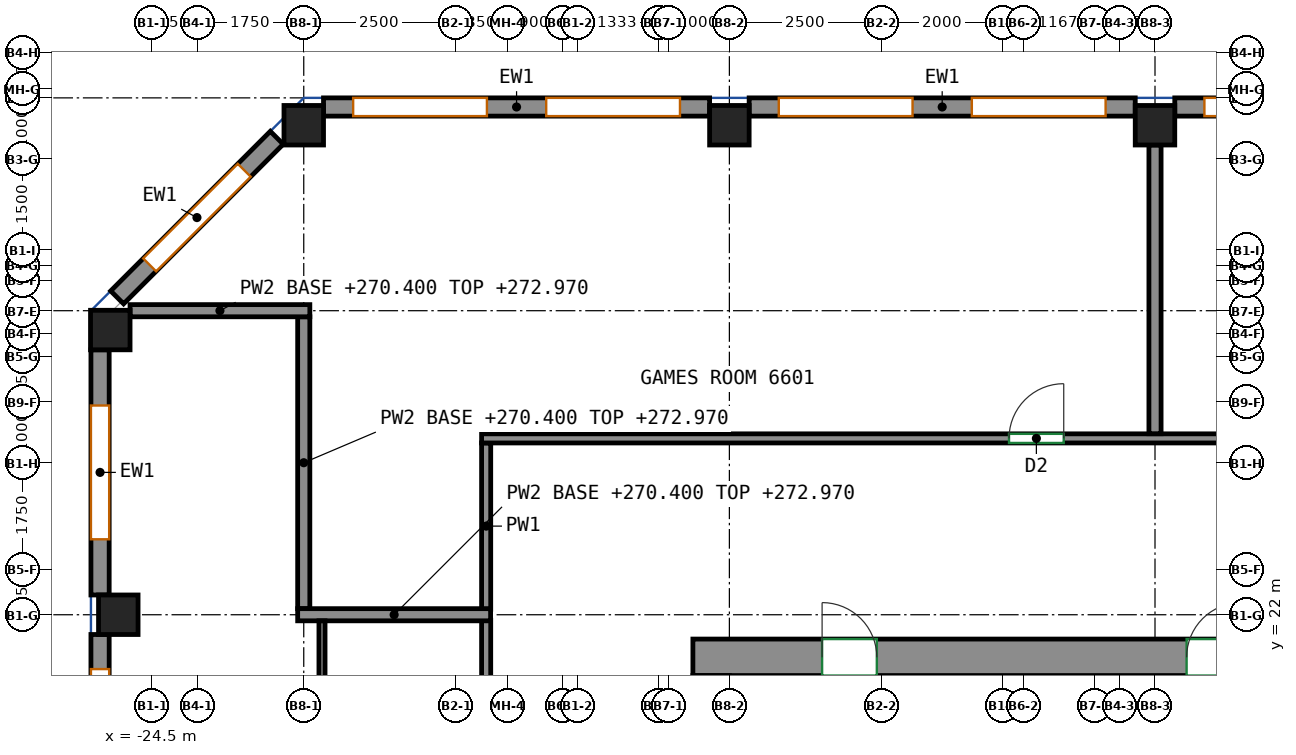
"""IFC4 building model, lengths in metres.
Left out: names, types, materials, properties, quantities, classifications, styles, units other than length and angle.
Written with IfcOpenShell. Run it as: python <this file> out.ifc"""

import sys

from ifc_helpers import new_model, si_unit, direction, frame, frame_2d, origin, origin_2d, place, context, subcontext, project, spatial, rectangle, extrude, source, transform, mapped, element, fill, save


model = new_model("IFC4")
c1 = context("Model", 3, precision=1e-05, world=origin(), true_north=direction((0.0, 1.0)))
c2 = subcontext(c1, "Body", "Model", "MODEL_VIEW")
j1 = project(units=[si_unit("LENGTHUNIT", "METRE"), si_unit("PLANEANGLEUNIT", "RADIAN")], contexts=[c1])
p1 = place(None, origin())
s1 = spatial("IfcSite", under=j1, at=p1, CompositionType="ELEMENT")
p2 = place(p1, origin())
s2 = spatial("IfcBuilding", under=s1, at=p2, CompositionType="ELEMENT")
p3 = place(p2, frame((0.0, 0.0, 270.4)))
s3 = spatial("IfcBuildingStorey", under=s2, at=p3, CompositionType="ELEMENT", Elevation=270.4)
m1 = source(origin(), c2, "Body", "SweptSolid", [
    extrude(rectangle(XDim=0.65, YDim=0.65, at=origin_2d()), origin(), (0.0, 0.0, 1.0), 3.12),
])
for number, where, z_axis, x_axis in (
    (1, (-25.182, 26.682, 0.0), (0.0, 0.0, 1.0), (1.0, 0.0, 0.0)),
    (2, (-25.05, 22.0, 0.0), (0.0, 0.0, 1.0), (1.0, 0.0, 0.0)),
    (3, (-22.0, 30.05, 0.0), (0.0, 0.0, 1.0), (1.0, 0.0, 0.0)),
    (4, (-15.0, 30.05, 0.0), (0.0, 0.0, 1.0), (1.0, 0.0, 0.0)),
    (5, (-8.0, 30.05, 0.0), (0.0, 0.0, 1.0), (1.0, 0.0, 0.0)),
):
    element("IfcColumn", number, at=place(p3, frame(where, z_axis=z_axis, x_axis=x_axis)), inside=s3, PredefinedType="COLUMN", context=c2, shape_type="MappedRepresentation", body=[
        mapped(m1, transform((0.0, 0.0, 0.0))),
    ])
m2 = source(origin(), c2, "Body", "SweptSolid", [
    extrude(rectangle(XDim=33.3, YDim=0.6, at=frame_2d((16.65, 0.0))), origin(), (0.0, 0.0, 1.0), 3.12),
])
p4 = place(p3, frame((-15.6, 21.3, 0.0), z_axis=(0.0, 0.0, 1.0), x_axis=(1.0, 0.0, 0.0)))
e6 = element("IfcWall", 6, at=p4, inside=s3, PredefinedType="SHEAR", context=c2, shape_type="MappedRepresentation", body=[
    mapped(m2, transform((0.0, 0.0, 0.0))),
])
p5 = place(p4, frame((8.12, 0.0, 0.0)))
e7 = element("IfcOpeningElement", 7, at=p5, cuts=e6, PredefinedType="OPENING", context=c2, shape_type="SweptSolid", body=[
    extrude(rectangle(XDim=0.9, YDim=2.1, at=frame_2d((0.45, 1.05))), frame((0.0, 0.31, 0.0), z_axis=(0.0, -1.0, 0.0), x_axis=(1.0, 0.0, 0.0)), (0.0, 0.0, 1.0), 0.62),
])
p6 = place(p4, frame((14.15, 0.0, 0.0)))
e8 = element("IfcOpeningElement", 8, at=p6, cuts=e6, PredefinedType="OPENING", context=c2, shape_type="SweptSolid", body=[
    extrude(rectangle(XDim=0.9, YDim=2.1, at=frame_2d((0.45, 1.05))), frame((0.0, 0.31, 0.0), z_axis=(0.0, -1.0, 0.0), x_axis=(1.0, 0.0, 0.0)), (0.0, 0.0, 1.0), 0.62),
])
p7 = place(p4, frame((18.974, 0.0, 0.0)))
e9 = element("IfcOpeningElement", 9, at=p7, cuts=e6, PredefinedType="OPENING", context=c2, shape_type="SweptSolid", body=[
    extrude(rectangle(XDim=0.9, YDim=2.1, at=frame_2d((0.45, 1.05))), frame((0.0, 0.31, 0.0), z_axis=(0.0, -1.0, 0.0), x_axis=(1.0, 0.0, 0.0)), (0.0, 0.0, 1.0), 0.62),
])
p8 = place(p4, frame((23.664, 0.0, 0.0)))
e10 = element("IfcOpeningElement", 10, at=p8, cuts=e6, PredefinedType="OPENING", context=c2, shape_type="SweptSolid", body=[
    extrude(rectangle(XDim=0.9, YDim=2.1, at=frame_2d((0.45, 1.05))), frame((0.0, 0.31, 0.0), z_axis=(0.0, -1.0, 0.0), x_axis=(1.0, 0.0, 0.0)), (0.0, 0.0, 1.0), 0.62),
])
p9 = place(p4, frame((26.92, 0.0, 0.0)))
e11 = element("IfcOpeningElement", 11, at=p9, cuts=e6, PredefinedType="OPENING", context=c2, shape_type="SweptSolid", body=[
    extrude(rectangle(XDim=0.9, YDim=2.1, at=frame_2d((0.45, 1.05))), frame((0.0, 0.31, 0.0), z_axis=(0.0, -1.0, 0.0), x_axis=(1.0, 0.0, 0.0)), (0.0, 0.0, 1.0), 0.62),
])
p10 = place(p4, frame((2.125, 0.0, 0.0)))
e12 = element("IfcOpeningElement", 12, at=p10, cuts=e6, PredefinedType="OPENING", context=c2, shape_type="SweptSolid", body=[
    extrude(rectangle(XDim=0.9, YDim=2.1, at=frame_2d((0.45, 1.05))), frame((0.0, 0.31, 0.0), z_axis=(0.0, -1.0, 0.0), x_axis=(1.0, 0.0, 0.0)), (0.0, 0.0, 1.0), 0.62),
])
p11 = place(p4, frame((30.275, 0.0, 0.0)))
e13 = element("IfcOpeningElement", 13, at=p11, cuts=e6, PredefinedType="OPENING", context=c2, shape_type="SweptSolid", body=[
    extrude(rectangle(XDim=0.9, YDim=2.1, at=frame_2d((0.45, 1.05))), frame((0.0, 0.31, 0.0), z_axis=(0.0, -1.0, 0.0), x_axis=(1.0, 0.0, 0.0)), (0.0, 0.0, 1.0), 0.62),
])
m3 = source(origin(), c2, "Body", "SweptSolid", [
    extrude(rectangle(XDim=6.35, YDim=0.3, at=frame_2d((3.175, 0.0))), origin(), (0.0, 0.0, 1.0), 3.12),
])
p12 = place(p3, frame((-1.325, 30.35, 0.0), z_axis=(0.0, 0.0, 1.0), x_axis=(-1.0, 0.0, 0.0)))
e14 = element("IfcWall", 14, at=p12, inside=s3, PredefinedType="SOLIDWALL", context=c2, shape_type="MappedRepresentation", body=[
    mapped(m3, transform((0.0, 0.0, 0.0))),
])
p13 = place(p12, frame((0.488, 0.0, 0.8)))
e15 = element("IfcOpeningElement", 15, at=p13, cuts=e14, PredefinedType="OPENING", context=c2, shape_type="SweptSolid", body=[
    extrude(rectangle(XDim=2.2, YDim=2.05, at=frame_2d((1.1, 1.025))), frame((0.0, 0.16, 0.0), z_axis=(0.0, -1.0, 0.0), x_axis=(1.0, 0.0, 0.0)), (0.0, 0.0, 1.0), 0.32),
])
p14 = place(p12, frame((3.663, 0.0, 0.8)))
e16 = element("IfcOpeningElement", 16, at=p14, cuts=e14, PredefinedType="OPENING", context=c2, shape_type="SweptSolid", body=[
    extrude(rectangle(XDim=2.2, YDim=2.05, at=frame_2d((1.1, 1.025))), frame((0.0, 0.16, 0.0), z_axis=(0.0, -1.0, 0.0), x_axis=(1.0, 0.0, 0.0)), (0.0, 0.0, 1.0), 0.32),
])
p15 = place(p3, frame((-8.325, 30.35, 0.0), z_axis=(0.0, 0.0, 1.0), x_axis=(-1.0, 0.0, 0.0)))
e17 = element("IfcWall", 17, at=p15, inside=s3, PredefinedType="SOLIDWALL", context=c2, shape_type="MappedRepresentation", body=[
    mapped(m3, transform((0.0, 0.0, 0.0))),
])
p16 = place(p15, frame((0.488, 0.0, 0.8)))
e18 = element("IfcOpeningElement", 18, at=p16, cuts=e17, PredefinedType="OPENING", context=c2, shape_type="SweptSolid", body=[
    extrude(rectangle(XDim=2.2, YDim=2.05, at=frame_2d((1.1, 1.025))), frame((0.0, 0.16, 0.0), z_axis=(0.0, -1.0, 0.0), x_axis=(1.0, 0.0, 0.0)), (0.0, 0.0, 1.0), 0.32),
])
p17 = place(p15, frame((3.663, 0.0, 0.8)))
e19 = element("IfcOpeningElement", 19, at=p17, cuts=e17, PredefinedType="OPENING", context=c2, shape_type="SweptSolid", body=[
    extrude(rectangle(XDim=2.2, YDim=2.05, at=frame_2d((1.1, 1.025))), frame((0.0, 0.16, 0.0), z_axis=(0.0, -1.0, 0.0), x_axis=(1.0, 0.0, 0.0)), (0.0, 0.0, 1.0), 0.32),
])
p18 = place(p3, frame((-15.325, 30.35, 0.0), z_axis=(0.0, 0.0, 1.0), x_axis=(-1.0, 0.0, 0.0)))
e20 = element("IfcWall", 20, at=p18, inside=s3, PredefinedType="SOLIDWALL", context=c2, shape_type="MappedRepresentation", body=[
    mapped(m3, transform((0.0, 0.0, 0.0))),
])
p19 = place(p18, frame((0.488, 0.0, 0.8)))
e21 = element("IfcOpeningElement", 21, at=p19, cuts=e20, PredefinedType="OPENING", context=c2, shape_type="SweptSolid", body=[
    extrude(rectangle(XDim=2.2, YDim=2.05, at=frame_2d((1.1, 1.025))), frame((0.0, 0.16, 0.0), z_axis=(0.0, -1.0, 0.0), x_axis=(1.0, 0.0, 0.0)), (0.0, 0.0, 1.0), 0.32),
])
p20 = place(p18, frame((3.663, 0.0, 0.8)))
e22 = element("IfcOpeningElement", 22, at=p20, cuts=e20, PredefinedType="OPENING", context=c2, shape_type="SweptSolid", body=[
    extrude(rectangle(XDim=2.2, YDim=2.05, at=frame_2d((1.1, 1.025))), frame((0.0, 0.16, 0.0), z_axis=(0.0, -1.0, 0.0), x_axis=(1.0, 0.0, 0.0)), (0.0, 0.0, 1.0), 0.32),
])
m4 = source(origin(), c2, "Body", "SweptSolid", [
    extrude(rectangle(XDim=3.712, YDim=0.3, at=frame_2d((1.856, 0.0))), origin(), (0.0, 0.0, 1.0), 3.12),
])
p21 = place(p3, frame((-22.444, 29.844, 0.0), z_axis=(0.0, 0.0, 1.0), x_axis=(-0.707106781187, -0.707106781187, 0.0)))
e23 = element("IfcWall", 23, at=p21, inside=s3, PredefinedType="SOLIDWALL", context=c2, shape_type="MappedRepresentation", body=[
    mapped(m4, transform((0.0, 0.0, 0.0))),
])
p22 = place(p21, frame((0.756, 0.0, 0.8)))
e24 = element("IfcOpeningElement", 24, at=p22, cuts=e23, PredefinedType="OPENING", context=c2, shape_type="SweptSolid", body=[
    extrude(rectangle(XDim=2.2, YDim=2.05, at=frame_2d((1.1, 1.025))), frame((0.0, 0.16, 0.0), z_axis=(0.0, -1.0, 0.0), x_axis=(1.0, 0.0, 0.0)), (0.0, 0.0, 1.0), 0.32),
])
m5 = source(origin(), c2, "Body", "SweptSolid", [
    extrude(rectangle(XDim=4.032, YDim=0.3, at=frame_2d((2.016, 0.0))), origin(), (0.0, 0.0, 1.0), 3.12),
])
p23 = place(p3, frame((-25.35, 26.357, 0.0), z_axis=(0.0, 0.0, 1.0), x_axis=(0.0, -1.0, 0.0)))
e25 = element("IfcWall", 25, at=p23, inside=s3, PredefinedType="SOLIDWALL", context=c2, shape_type="MappedRepresentation", body=[
    mapped(m5, transform((0.0, 0.0, 0.0))),
])
p24 = place(p23, frame((0.916, 0.0, 0.8)))
e26 = element("IfcOpeningElement", 26, at=p24, cuts=e25, PredefinedType="OPENING", context=c2, shape_type="SweptSolid", body=[
    extrude(rectangle(XDim=2.2, YDim=2.05, at=frame_2d((1.1, 1.025))), frame((0.0, 0.16, 0.0), z_axis=(0.0, -1.0, 0.0), x_axis=(1.0, 0.0, 0.0)), (0.0, 0.0, 1.0), 0.32),
])
m6 = source(origin(), c2, "Body", "SweptSolid", [
    extrude(rectangle(XDim=13.35, YDim=0.3, at=frame_2d((6.675, 0.0))), origin(), (0.0, 0.0, 1.0), 3.12),
])
p25 = place(p3, frame((-25.35, 21.675, 0.0), z_axis=(0.0, 0.0, 1.0), x_axis=(0.0, -1.0, 0.0)))
e27 = element("IfcWall", 27, at=p25, inside=s3, PredefinedType="SOLIDWALL", context=c2, shape_type="MappedRepresentation", body=[
    mapped(m6, transform((0.0, 0.0, 0.0))),
])
p26 = place(p25, frame((0.569, 0.0, 0.8)))
e28 = element("IfcOpeningElement", 28, at=p26, cuts=e27, PredefinedType="OPENING", context=c2, shape_type="SweptSolid", body=[
    extrude(rectangle(XDim=2.2, YDim=2.05, at=frame_2d((1.1, 1.025))), frame((0.0, 0.16, 0.0), z_axis=(0.0, -1.0, 0.0), x_axis=(1.0, 0.0, 0.0)), (0.0, 0.0, 1.0), 0.32),
])
p27 = place(p25, frame((3.906, 0.0, 0.8)))
e29 = element("IfcOpeningElement", 29, at=p27, cuts=e27, PredefinedType="OPENING", context=c2, shape_type="SweptSolid", body=[
    extrude(rectangle(XDim=2.2, YDim=2.05, at=frame_2d((1.1, 1.025))), frame((0.0, 0.16, 0.0), z_axis=(0.0, -1.0, 0.0), x_axis=(1.0, 0.0, 0.0)), (0.0, 0.0, 1.0), 0.32),
])
p28 = place(p25, frame((7.244, 0.0, 0.8)))
e30 = element("IfcOpeningElement", 30, at=p28, cuts=e27, PredefinedType="OPENING", context=c2, shape_type="SweptSolid", body=[
    extrude(rectangle(XDim=2.2, YDim=2.05, at=frame_2d((1.1, 1.025))), frame((0.0, 0.16, 0.0), z_axis=(0.0, -1.0, 0.0), x_axis=(1.0, 0.0, 0.0)), (0.0, 0.0, 1.0), 0.32),
])
p29 = place(p25, frame((10.581, 0.0, 0.8)))
e31 = element("IfcOpeningElement", 31, at=p29, cuts=e27, PredefinedType="OPENING", context=c2, shape_type="SweptSolid", body=[
    extrude(rectangle(XDim=2.2, YDim=2.05, at=frame_2d((1.1, 1.025))), frame((0.0, 0.16, 0.0), z_axis=(0.0, -1.0, 0.0), x_axis=(1.0, 0.0, 0.0)), (0.0, 0.0, 1.0), 0.32),
])
p30 = place(p3, frame((-19.0, 22.09, 0.0), z_axis=(0.0, 0.0, 1.0), x_axis=(0.0, 1.0, 0.0)))
e32 = element("IfcWall", 32, at=p30, inside=s3, PredefinedType="PARTITIONING", context=c2, shape_type="SweptSolid", body=[
    extrude(rectangle(XDim=2.735, YDim=0.15, at=frame_2d((1.367, 0.0))), origin(), (0.0, 0.0, 1.0), 3.12),
])
p31 = place(p3, frame((-19.075, 24.9, 0.0), z_axis=(0.0, 0.0, 1.0), x_axis=(1.0, 0.0, 0.0)))
e33 = element("IfcWall", 33, at=p31, inside=s3, PredefinedType="PARTITIONING", context=c2, shape_type="SweptSolid", body=[
    extrude(rectangle(XDim=39.75, YDim=0.15, at=frame_2d((19.875, 0.0))), origin(), (0.0, 0.0, 1.0), 3.12),
])
p32 = place(p31, frame((8.674, 0.0, 0.0)))
e34 = element("IfcOpeningElement", 34, at=p32, cuts=e33, PredefinedType="OPENING", context=c2, shape_type="SweptSolid", body=[
    extrude(rectangle(XDim=0.9, YDim=2.1, at=frame_2d((0.45, 1.05))), frame((0.0, 0.085, 0.0), z_axis=(0.0, -1.0, 0.0), x_axis=(1.0, 0.0, 0.0)), (0.0, 0.0, 1.0), 0.17),
])
p33 = place(p31, frame((13.778, 0.0, 0.0)))
e35 = element("IfcOpeningElement", 35, at=p33, cuts=e33, PredefinedType="OPENING", context=c2, shape_type="SweptSolid", body=[
    extrude(rectangle(XDim=0.9, YDim=2.1, at=frame_2d((0.45, 1.05))), frame((0.0, 0.085, 0.0), z_axis=(0.0, -1.0, 0.0), x_axis=(1.0, 0.0, 0.0)), (0.0, 0.0, 1.0), 0.17),
])
p34 = place(p3, frame((-19.0, 17.28, 0.0), z_axis=(0.0, 0.0, 1.0), x_axis=(0.0, 1.0, 0.0)))
e36 = element("IfcWall", 36, at=p34, inside=s3, PredefinedType="PARTITIONING", context=c2, shape_type="SweptSolid", body=[
    extrude(rectangle(XDim=4.63, YDim=0.15, at=frame_2d((2.315, 0.0))), origin(), (0.0, 0.0, 1.0), 3.12),
])
p35 = place(p3, frame((-8.0, 29.725, 0.0), z_axis=(0.0, 0.0, 1.0), x_axis=(0.0, -1.0, 0.0)))
e37 = element("IfcWall", 37, at=p35, inside=s3, PredefinedType="PARTITIONING", context=c2, shape_type="SweptSolid", body=[
    extrude(rectangle(XDim=4.748, YDim=0.2, at=frame_2d((2.374, 0.0))), origin(), (0.0, 0.0, 1.0), 3.12),
])
p36 = place(p3, frame((-22.0, 22.1, 0.0), z_axis=(0.0, 0.0, 1.0), x_axis=(0.0, 1.0, 0.0)))
e38 = element("IfcWall", 38, at=p36, inside=s3, PredefinedType="PARTITIONING", context=c2, shape_type="SweptSolid", body=[
    extrude(rectangle(XDim=4.8, YDim=0.2, at=frame_2d((2.4, 0.0))), origin(), (0.0, 0.0, 1.0), 2.57),
])
p37 = place(p3, frame((-24.857, 27.0, 0.0), z_axis=(0.0, 0.0, 1.0), x_axis=(1.0, 0.0, 0.0)))
e39 = element("IfcWall", 39, at=p37, inside=s3, PredefinedType="PARTITIONING", context=c2, shape_type="SweptSolid", body=[
    extrude(rectangle(XDim=2.957, YDim=0.2, at=frame_2d((1.479, 0.0))), origin(), (0.0, 0.0, 1.0), 2.57),
])
p38 = place(p3, frame((-22.1, 22.0, 0.0), z_axis=(0.0, 0.0, 1.0), x_axis=(1.0, 0.0, 0.0)))
e40 = element("IfcWall", 40, at=p38, inside=s3, PredefinedType="PARTITIONING", context=c2, shape_type="SweptSolid", body=[
    extrude(rectangle(XDim=3.173, YDim=0.2, at=frame_2d((1.586, 0.0))), origin(), (0.0, 0.0, 1.0), 2.57),
])
p39 = place(p3, frame((-21.7, 19.281, 0.0), z_axis=(0.0, 0.0, 1.0), x_axis=(0.0, 1.0, 0.0)))
e41 = element("IfcWall", 41, at=p39, inside=s3, PredefinedType="PARTITIONING", context=c2, shape_type="SweptSolid", body=[
    extrude(rectangle(XDim=2.619, YDim=0.1, at=frame_2d((1.31, 0.0))), origin(), (0.0, 0.0, 1.0), 2.57),
])
p40 = place(p14, origin())
e42 = element("IfcWindow", 42, at=p40, inside=s3, PartitioningType="SINGLE_PANEL", PredefinedType="WINDOW", context=c2, shape_type="SweptSolid", body=[
    extrude(rectangle(XDim=2.2, YDim=2.05, at=frame_2d((1.1, 1.025))), frame((0.0, 0.03, 0.0), z_axis=(0.0, -1.0, 0.0), x_axis=(1.0, 0.0, 0.0)), (0.0, 0.0, 1.0), 0.06),
])
fill(e16, e42)
p41 = place(p16, origin())
e43 = element("IfcWindow", 43, at=p41, inside=s3, PartitioningType="SINGLE_PANEL", PredefinedType="WINDOW", context=c2, shape_type="SweptSolid", body=[
    extrude(rectangle(XDim=2.2, YDim=2.05, at=frame_2d((1.1, 1.025))), frame((0.0, 0.03, 0.0), z_axis=(0.0, -1.0, 0.0), x_axis=(1.0, 0.0, 0.0)), (0.0, 0.0, 1.0), 0.06),
])
fill(e18, e43)
p42 = place(p17, origin())
e44 = element("IfcWindow", 44, at=p42, inside=s3, PartitioningType="SINGLE_PANEL", PredefinedType="WINDOW", context=c2, shape_type="SweptSolid", body=[
    extrude(rectangle(XDim=2.2, YDim=2.05, at=frame_2d((1.1, 1.025))), frame((0.0, 0.03, 0.0), z_axis=(0.0, -1.0, 0.0), x_axis=(1.0, 0.0, 0.0)), (0.0, 0.0, 1.0), 0.06),
])
fill(e19, e44)
p43 = place(p19, origin())
e45 = element("IfcWindow", 45, at=p43, inside=s3, PartitioningType="SINGLE_PANEL", PredefinedType="WINDOW", context=c2, shape_type="SweptSolid", body=[
    extrude(rectangle(XDim=2.2, YDim=2.05, at=frame_2d((1.1, 1.025))), frame((0.0, 0.03, 0.0), z_axis=(0.0, -1.0, 0.0), x_axis=(1.0, 0.0, 0.0)), (0.0, 0.0, 1.0), 0.06),
])
fill(e21, e45)
p44 = place(p20, origin())
e46 = element("IfcWindow", 46, at=p44, inside=s3, PartitioningType="SINGLE_PANEL", PredefinedType="WINDOW", context=c2, shape_type="SweptSolid", body=[
    extrude(rectangle(XDim=2.2, YDim=2.05, at=frame_2d((1.1, 1.025))), frame((0.0, 0.03, 0.0), z_axis=(0.0, -1.0, 0.0), x_axis=(1.0, 0.0, 0.0)), (0.0, 0.0, 1.0), 0.06),
])
fill(e22, e46)
p45 = place(p22, origin())
e47 = element("IfcWindow", 47, at=p45, inside=s3, PartitioningType="SINGLE_PANEL", PredefinedType="WINDOW", context=c2, shape_type="SweptSolid", body=[
    extrude(rectangle(XDim=2.2, YDim=2.05, at=frame_2d((1.1, 1.025))), frame((0.0, 0.03, 0.0), z_axis=(0.0, -1.0, 0.0), x_axis=(1.0, 0.0, 0.0)), (0.0, 0.0, 1.0), 0.06),
])
fill(e24, e47)
p46 = place(p24, origin())
e48 = element("IfcWindow", 48, at=p46, inside=s3, PartitioningType="SINGLE_PANEL", PredefinedType="WINDOW", context=c2, shape_type="SweptSolid", body=[
    extrude(rectangle(XDim=2.2, YDim=2.05, at=frame_2d((1.1, 1.025))), frame((0.0, 0.03, 0.0), z_axis=(0.0, -1.0, 0.0), x_axis=(1.0, 0.0, 0.0)), (0.0, 0.0, 1.0), 0.06),
])
fill(e26, e48)
p47 = place(p26, origin())
e49 = element("IfcWindow", 49, at=p47, inside=s3, PartitioningType="SINGLE_PANEL", PredefinedType="WINDOW", context=c2, shape_type="SweptSolid", body=[
    extrude(rectangle(XDim=2.2, YDim=2.05, at=frame_2d((1.1, 1.025))), frame((0.0, 0.03, 0.0), z_axis=(0.0, -1.0, 0.0), x_axis=(1.0, 0.0, 0.0)), (0.0, 0.0, 1.0), 0.06),
])
fill(e28, e49)
p48 = place(p5, origin())
e50 = element("IfcDoor", 50, at=p48, inside=s3, OperationType="SINGLE_SWING_RIGHT", PredefinedType="DOOR", context=c2, shape_type="SweptSolid", body=[
    extrude(rectangle(XDim=0.9, YDim=2.1, at=frame_2d((0.45, 1.05))), frame((0.0, -0.155, 0.0), z_axis=(0.0, -1.0, 0.0), x_axis=(1.0, 0.0, 0.0)), (0.0, 0.0, 1.0), 0.05),
])
fill(e7, e50)
p49 = place(p10, origin())
e51 = element("IfcDoor", 51, at=p49, inside=s3, OperationType="SINGLE_SWING_LEFT", PredefinedType="DOOR", context=c2, shape_type="SweptSolid", body=[
    extrude(rectangle(XDim=0.9, YDim=2.1, at=frame_2d((0.45, 1.05))), frame((0.0, -0.155, 0.0), z_axis=(0.0, -1.0, 0.0), x_axis=(1.0, 0.0, 0.0)), (0.0, 0.0, 1.0), 0.05),
])
fill(e12, e51)
p50 = place(p32, origin())
e52 = element("IfcDoor", 52, at=p50, inside=s3, OperationType="SINGLE_SWING_RIGHT", PredefinedType="DOOR", context=c2, shape_type="SweptSolid", body=[
    extrude(rectangle(XDim=0.9, YDim=2.1, at=frame_2d((0.45, 1.05))), frame((0.0, 0.025, 0.0), z_axis=(0.0, -1.0, 0.0), x_axis=(1.0, 0.0, 0.0)), (0.0, 0.0, 1.0), 0.05),
])
fill(e34, e52)
save(model, sys.argv[1])
